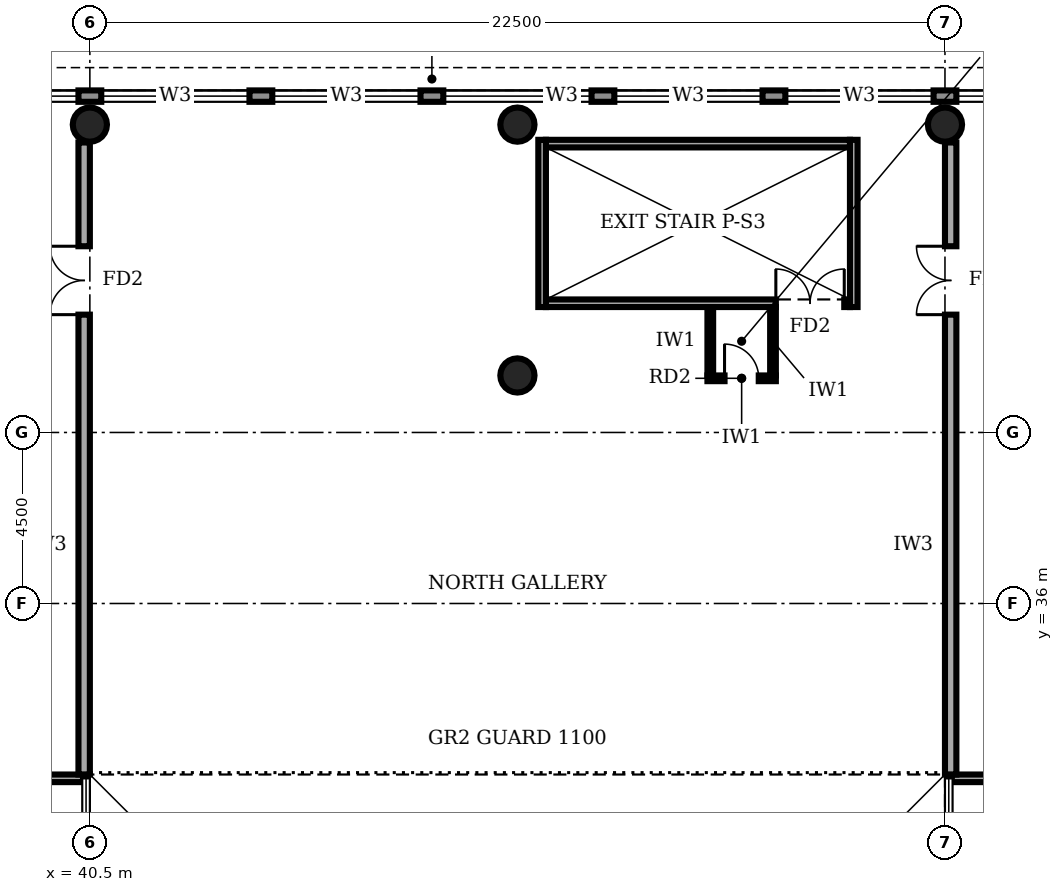
"""IFC4 building model, lengths in metres.
Left out: names, types, materials, properties, quantities, classifications, styles, units other than length and angle.
Written with IfcOpenShell. Run it as: python <this file> out.ifc"""

import sys

from ifc_helpers import new_model, si_unit, direction, frame, frame_2d, origin, origin_2d, place, context, subcontext, project, spatial, rectangle, circle, extrude, element, fill, save


model = new_model("IFC4")
c1 = context("Model", 3, precision=1e-05, world=origin(), true_north=direction((0.0, 1.0)))
c2 = subcontext(c1, "Body", "Model", "MODEL_VIEW")
j1 = project(units=[si_unit("LENGTHUNIT", "METRE"), si_unit("PLANEANGLEUNIT", "RADIAN")], contexts=[c1])
p1 = place(None, origin())
s1 = spatial("IfcSite", under=j1, at=p1, CompositionType="ELEMENT")
p2 = place(p1, origin())
s2 = spatial("IfcBuilding", under=s1, at=p2, CompositionType="ELEMENT")
p3 = place(p2, frame((0.0, 0.0, 16.0)))
s3 = spatial("IfcBuildingStorey", under=s2, at=p3, CompositionType="ELEMENT", Elevation=16.0)
for number, where, z_axis, x_axis in (
    (1, (51.75, 42.0, 0.0), (0.0, 0.0, 1.0), (1.0, 0.0, 0.0)),
    (2, (40.5, 48.6, 0.0), (0.0, 0.0, 1.0), (1.0, 0.0, 0.0)),
    (3, (51.75, 48.6, 0.0), (0.0, 0.0, 1.0), (1.0, 0.0, 0.0)),
    (4, (63.0, 48.6, 0.0), (0.0, 0.0, 1.0), (1.0, 0.0, 0.0)),
):
    element("IfcColumn", number, at=place(p3, frame(where, z_axis=z_axis, x_axis=x_axis)), inside=s3, PredefinedType="COLUMN", context=c2, shape_type="SweptSolid", body=[
        extrude(circle(Radius=0.45, at=origin_2d()), origin(), (0.0, 0.0, 1.0), 5.0),
    ])
p4 = place(p3, frame((98.98, 49.35, 0.0), z_axis=(0.0, 0.0, 1.0), x_axis=(-1.0, 0.0, 0.0)))
e5 = element("IfcWall", 5, at=p4, inside=s3, PredefinedType="STANDARD", context=c2, shape_type="SweptSolid", body=[
    extrude(rectangle(XDim=98.96, YDim=0.3, at=frame_2d((49.48, 0.0))), origin(), (0.0, 0.0, 1.0), 4.7),
])
p5 = place(p4, frame((94.78, 0.0, 0.95)))
e6 = element("IfcOpeningElement", 6, at=p5, cuts=e5, PredefinedType="OPENING", context=c2, shape_type="SweptSolid", body=[
    extrude(rectangle(XDim=3.9, YDim=1.8, at=frame_2d((1.95, 0.9))), frame((0.0, 0.16, 0.0), z_axis=(0.0, -1.0, 0.0), x_axis=(1.0, 0.0, 0.0)), (0.0, 0.0, 1.0), 0.32),
])
p6 = place(p4, frame((90.28, 0.0, 0.95)))
e7 = element("IfcOpeningElement", 7, at=p6, cuts=e5, PredefinedType="OPENING", context=c2, shape_type="SweptSolid", body=[
    extrude(rectangle(XDim=3.9, YDim=1.8, at=frame_2d((1.95, 0.9))), frame((0.0, 0.16, 0.0), z_axis=(0.0, -1.0, 0.0), x_axis=(1.0, 0.0, 0.0)), (0.0, 0.0, 1.0), 0.32),
])
p7 = place(p4, frame((85.78, 0.0, 0.95)))
e8 = element("IfcOpeningElement", 8, at=p7, cuts=e5, PredefinedType="OPENING", context=c2, shape_type="SweptSolid", body=[
    extrude(rectangle(XDim=3.9, YDim=1.8, at=frame_2d((1.95, 0.9))), frame((0.0, 0.16, 0.0), z_axis=(0.0, -1.0, 0.0), x_axis=(1.0, 0.0, 0.0)), (0.0, 0.0, 1.0), 0.32),
])
p8 = place(p4, frame((81.28, 0.0, 0.95)))
e9 = element("IfcOpeningElement", 9, at=p8, cuts=e5, PredefinedType="OPENING", context=c2, shape_type="SweptSolid", body=[
    extrude(rectangle(XDim=3.9, YDim=1.8, at=frame_2d((1.95, 0.9))), frame((0.0, 0.16, 0.0), z_axis=(0.0, -1.0, 0.0), x_axis=(1.0, 0.0, 0.0)), (0.0, 0.0, 1.0), 0.32),
])
p9 = place(p4, frame((76.78, 0.0, 0.95)))
e10 = element("IfcOpeningElement", 10, at=p9, cuts=e5, PredefinedType="OPENING", context=c2, shape_type="SweptSolid", body=[
    extrude(rectangle(XDim=3.9, YDim=1.8, at=frame_2d((1.95, 0.9))), frame((0.0, 0.16, 0.0), z_axis=(0.0, -1.0, 0.0), x_axis=(1.0, 0.0, 0.0)), (0.0, 0.0, 1.0), 0.32),
])
p10 = place(p4, frame((72.28, 0.0, 0.95)))
e11 = element("IfcOpeningElement", 11, at=p10, cuts=e5, PredefinedType="OPENING", context=c2, shape_type="SweptSolid", body=[
    extrude(rectangle(XDim=3.9, YDim=1.8, at=frame_2d((1.95, 0.9))), frame((0.0, 0.16, 0.0), z_axis=(0.0, -1.0, 0.0), x_axis=(1.0, 0.0, 0.0)), (0.0, 0.0, 1.0), 0.32),
])
p11 = place(p4, frame((67.78, 0.0, 0.95)))
e12 = element("IfcOpeningElement", 12, at=p11, cuts=e5, PredefinedType="OPENING", context=c2, shape_type="SweptSolid", body=[
    extrude(rectangle(XDim=3.9, YDim=1.8, at=frame_2d((1.95, 0.9))), frame((0.0, 0.16, 0.0), z_axis=(0.0, -1.0, 0.0), x_axis=(1.0, 0.0, 0.0)), (0.0, 0.0, 1.0), 0.32),
])
p12 = place(p4, frame((63.28, 0.0, 0.95)))
e13 = element("IfcOpeningElement", 13, at=p12, cuts=e5, PredefinedType="OPENING", context=c2, shape_type="SweptSolid", body=[
    extrude(rectangle(XDim=3.9, YDim=1.8, at=frame_2d((1.95, 0.9))), frame((0.0, 0.16, 0.0), z_axis=(0.0, -1.0, 0.0), x_axis=(1.0, 0.0, 0.0)), (0.0, 0.0, 1.0), 0.32),
])
p13 = place(p4, frame((58.78, 0.0, 0.95)))
e14 = element("IfcOpeningElement", 14, at=p13, cuts=e5, PredefinedType="OPENING", context=c2, shape_type="SweptSolid", body=[
    extrude(rectangle(XDim=3.9, YDim=1.8, at=frame_2d((1.95, 0.9))), frame((0.0, 0.16, 0.0), z_axis=(0.0, -1.0, 0.0), x_axis=(1.0, 0.0, 0.0)), (0.0, 0.0, 1.0), 0.32),
])
p14 = place(p4, frame((54.28, 0.0, 0.95)))
e15 = element("IfcOpeningElement", 15, at=p14, cuts=e5, PredefinedType="OPENING", context=c2, shape_type="SweptSolid", body=[
    extrude(rectangle(XDim=3.9, YDim=1.8, at=frame_2d((1.95, 0.9))), frame((0.0, 0.16, 0.0), z_axis=(0.0, -1.0, 0.0), x_axis=(1.0, 0.0, 0.0)), (0.0, 0.0, 1.0), 0.32),
])
p15 = place(p4, frame((49.78, 0.0, 0.95)))
e16 = element("IfcOpeningElement", 16, at=p15, cuts=e5, PredefinedType="OPENING", context=c2, shape_type="SweptSolid", body=[
    extrude(rectangle(XDim=3.9, YDim=1.8, at=frame_2d((1.95, 0.9))), frame((0.0, 0.16, 0.0), z_axis=(0.0, -1.0, 0.0), x_axis=(1.0, 0.0, 0.0)), (0.0, 0.0, 1.0), 0.32),
])
p16 = place(p4, frame((45.28, 0.0, 0.95)))
e17 = element("IfcOpeningElement", 17, at=p16, cuts=e5, PredefinedType="OPENING", context=c2, shape_type="SweptSolid", body=[
    extrude(rectangle(XDim=3.9, YDim=1.8, at=frame_2d((1.95, 0.9))), frame((0.0, 0.16, 0.0), z_axis=(0.0, -1.0, 0.0), x_axis=(1.0, 0.0, 0.0)), (0.0, 0.0, 1.0), 0.32),
])
p17 = place(p4, frame((40.78, 0.0, 0.95)))
e18 = element("IfcOpeningElement", 18, at=p17, cuts=e5, PredefinedType="OPENING", context=c2, shape_type="SweptSolid", body=[
    extrude(rectangle(XDim=3.9, YDim=1.8, at=frame_2d((1.95, 0.9))), frame((0.0, 0.16, 0.0), z_axis=(0.0, -1.0, 0.0), x_axis=(1.0, 0.0, 0.0)), (0.0, 0.0, 1.0), 0.32),
])
p18 = place(p4, frame((36.28, 0.0, 0.95)))
e19 = element("IfcOpeningElement", 19, at=p18, cuts=e5, PredefinedType="OPENING", context=c2, shape_type="SweptSolid", body=[
    extrude(rectangle(XDim=3.9, YDim=1.8, at=frame_2d((1.95, 0.9))), frame((0.0, 0.16, 0.0), z_axis=(0.0, -1.0, 0.0), x_axis=(1.0, 0.0, 0.0)), (0.0, 0.0, 1.0), 0.32),
])
p19 = place(p4, frame((31.78, 0.0, 0.95)))
e20 = element("IfcOpeningElement", 20, at=p19, cuts=e5, PredefinedType="OPENING", context=c2, shape_type="SweptSolid", body=[
    extrude(rectangle(XDim=3.9, YDim=1.8, at=frame_2d((1.95, 0.9))), frame((0.0, 0.16, 0.0), z_axis=(0.0, -1.0, 0.0), x_axis=(1.0, 0.0, 0.0)), (0.0, 0.0, 1.0), 0.32),
])
p20 = place(p4, frame((27.28, 0.0, 0.95)))
e21 = element("IfcOpeningElement", 21, at=p20, cuts=e5, PredefinedType="OPENING", context=c2, shape_type="SweptSolid", body=[
    extrude(rectangle(XDim=3.9, YDim=1.8, at=frame_2d((1.95, 0.9))), frame((0.0, 0.16, 0.0), z_axis=(0.0, -1.0, 0.0), x_axis=(1.0, 0.0, 0.0)), (0.0, 0.0, 1.0), 0.32),
])
p21 = place(p4, frame((22.78, 0.0, 0.95)))
e22 = element("IfcOpeningElement", 22, at=p21, cuts=e5, PredefinedType="OPENING", context=c2, shape_type="SweptSolid", body=[
    extrude(rectangle(XDim=3.9, YDim=1.8, at=frame_2d((1.95, 0.9))), frame((0.0, 0.16, 0.0), z_axis=(0.0, -1.0, 0.0), x_axis=(1.0, 0.0, 0.0)), (0.0, 0.0, 1.0), 0.32),
])
p22 = place(p4, frame((18.28, 0.0, 0.95)))
e23 = element("IfcOpeningElement", 23, at=p22, cuts=e5, PredefinedType="OPENING", context=c2, shape_type="SweptSolid", body=[
    extrude(rectangle(XDim=3.9, YDim=1.8, at=frame_2d((1.95, 0.9))), frame((0.0, 0.16, 0.0), z_axis=(0.0, -1.0, 0.0), x_axis=(1.0, 0.0, 0.0)), (0.0, 0.0, 1.0), 0.32),
])
p23 = place(p4, frame((13.78, 0.0, 0.95)))
e24 = element("IfcOpeningElement", 24, at=p23, cuts=e5, PredefinedType="OPENING", context=c2, shape_type="SweptSolid", body=[
    extrude(rectangle(XDim=3.9, YDim=1.8, at=frame_2d((1.95, 0.9))), frame((0.0, 0.16, 0.0), z_axis=(0.0, -1.0, 0.0), x_axis=(1.0, 0.0, 0.0)), (0.0, 0.0, 1.0), 0.32),
])
p24 = place(p4, frame((9.28, 0.0, 0.95)))
e25 = element("IfcOpeningElement", 25, at=p24, cuts=e5, PredefinedType="OPENING", context=c2, shape_type="SweptSolid", body=[
    extrude(rectangle(XDim=3.9, YDim=1.8, at=frame_2d((1.95, 0.9))), frame((0.0, 0.16, 0.0), z_axis=(0.0, -1.0, 0.0), x_axis=(1.0, 0.0, 0.0)), (0.0, 0.0, 1.0), 0.32),
])
p25 = place(p4, frame((4.78, 0.0, 0.95)))
e26 = element("IfcOpeningElement", 26, at=p25, cuts=e5, PredefinedType="OPENING", context=c2, shape_type="SweptSolid", body=[
    extrude(rectangle(XDim=3.9, YDim=1.8, at=frame_2d((1.95, 0.9))), frame((0.0, 0.16, 0.0), z_axis=(0.0, -1.0, 0.0), x_axis=(1.0, 0.0, 0.0)), (0.0, 0.0, 1.0), 0.32),
])
p26 = place(p3, frame((28.8, 31.4, 0.0), z_axis=(0.0, 0.0, 1.0), x_axis=(1.0, 0.0, 0.0)))
e27 = element("IfcWall", 27, at=p26, inside=s3, PredefinedType="SOLIDWALL", context=c2, shape_type="SweptSolid", body=[
    extrude(rectangle(XDim=11.52, YDim=0.2, at=frame_2d((5.76, 0.0))), origin(), (0.0, 0.0, 1.0), 4.7),
])
p27 = place(p3, frame((63.18, 31.4, 0.0), z_axis=(0.0, 0.0, 1.0), x_axis=(1.0, 0.0, 0.0)))
e28 = element("IfcWall", 28, at=p27, inside=s3, PredefinedType="SOLIDWALL", context=c2, shape_type="SweptSolid", body=[
    extrude(rectangle(XDim=9.27, YDim=0.2, at=frame_2d((4.635, 0.0))), origin(), (0.0, 0.0, 1.0), 4.7),
])
p28 = place(p3, frame((52.5, 43.9, 0.0), z_axis=(0.0, 0.0, 1.0), x_axis=(1.0, 0.0, 0.0)))
e29 = element("IfcWall", 29, at=p28, inside=s3, PredefinedType="SOLIDWALL", context=c2, shape_type="SweptSolid", body=[
    extrude(rectangle(XDim=8.0, YDim=0.2, at=frame_2d((4.0, 0.0))), origin(), (0.0, 0.0, 1.0), 4.7),
])
p29 = place(p28, frame((6.05, 0.0, 0.0)))
e30 = element("IfcOpeningElement", 30, at=p29, cuts=e29, PredefinedType="OPENING", context=c2, shape_type="SweptSolid", body=[
    extrude(rectangle(XDim=1.8, YDim=2.1, at=frame_2d((0.9, 1.05))), frame((0.0, 0.11, 0.0), z_axis=(0.0, -1.0, 0.0), x_axis=(1.0, 0.0, 0.0)), (0.0, 0.0, 1.0), 0.22),
])
p30 = place(p3, frame((52.5, 48.1, 0.0), z_axis=(0.0, 0.0, 1.0), x_axis=(1.0, 0.0, 0.0)))
e31 = element("IfcWall", 31, at=p30, inside=s3, PredefinedType="SOLIDWALL", context=c2, shape_type="SweptSolid", body=[
    extrude(rectangle(XDim=8.0, YDim=0.2, at=frame_2d((4.0, 0.0))), origin(), (0.0, 0.0, 1.0), 4.7),
])
for number, where, z_axis, x_axis in (
    (32, (52.4, 43.8, 0.0), (0.0, 0.0, 1.0), (0.0, 1.0, 0.0)),
    (33, (60.6, 43.8, 0.0), (0.0, 0.0, 1.0), (0.0, 1.0, 0.0)),
):
    element("IfcWall", number, at=place(p3, frame(where, z_axis=z_axis, x_axis=x_axis)), inside=s3, PredefinedType="SOLIDWALL", context=c2, shape_type="SweptSolid", body=[
        extrude(rectangle(XDim=4.4, YDim=0.2, at=frame_2d((2.2, 0.0))), origin(), (0.0, 0.0, 1.0), 4.7),
    ])
p31 = place(p3, frame((40.35, 31.5, 0.0), z_axis=(0.0, 0.0, 1.0), x_axis=(0.0, 1.0, 0.0)))
e34 = element("IfcWall", 34, at=p31, inside=s3, PredefinedType="SOLIDWALL", context=c2, shape_type="SweptSolid", body=[
    extrude(rectangle(XDim=16.63, YDim=0.3, at=frame_2d((8.315, 0.0))), origin(), (0.0, 0.0, 1.0), 4.7),
])
p32 = place(p31, frame((12.1, 0.0, 0.0)))
e35 = element("IfcOpeningElement", 35, at=p32, cuts=e34, PredefinedType="OPENING", context=c2, shape_type="SweptSolid", body=[
    extrude(rectangle(XDim=1.8, YDim=2.1, at=frame_2d((0.9, 1.05))), frame((0.0, 0.16, 0.0), z_axis=(0.0, -1.0, 0.0), x_axis=(1.0, 0.0, 0.0)), (0.0, 0.0, 1.0), 0.32),
])
p33 = place(p3, frame((63.15, 31.5, 0.0), z_axis=(0.0, 0.0, 1.0), x_axis=(0.0, 1.0, 0.0)))
e36 = element("IfcWall", 36, at=p33, inside=s3, PredefinedType="SOLIDWALL", context=c2, shape_type="SweptSolid", body=[
    extrude(rectangle(XDim=16.63, YDim=0.3, at=frame_2d((8.315, 0.0))), origin(), (0.0, 0.0, 1.0), 4.7),
])
p34 = place(p33, frame((12.1, 0.0, 0.0)))
e37 = element("IfcOpeningElement", 37, at=p34, cuts=e36, PredefinedType="OPENING", context=c2, shape_type="SweptSolid", body=[
    extrude(rectangle(XDim=1.8, YDim=2.1, at=frame_2d((0.9, 1.05))), frame((0.0, 0.16, 0.0), z_axis=(0.0, -1.0, 0.0), x_axis=(1.0, 0.0, 0.0)), (0.0, 0.0, 1.0), 0.32),
])
p35 = place(p3, frame((58.475, 42.0, 0.0), z_axis=(0.0, 0.0, 1.0), x_axis=(0.0, 1.0, 0.0)))
e38 = element("IfcWall", 38, at=p35, inside=s3, PredefinedType="PARTITIONING", context=c2, shape_type="SweptSolid", body=[
    extrude(rectangle(XDim=1.8, YDim=0.15, at=frame_2d((0.9, 0.0))), origin(), (0.0, 0.0, 1.0), 4.7),
])
p36 = place(p3, frame((56.75, 41.925, 0.0), z_axis=(0.0, 0.0, 1.0), x_axis=(1.0, 0.0, 0.0)))
e39 = element("IfcWall", 39, at=p36, inside=s3, PredefinedType="PARTITIONING", context=c2, shape_type="SweptSolid", body=[
    extrude(rectangle(XDim=1.8, YDim=0.15, at=frame_2d((0.9, 0.0))), origin(), (0.0, 0.0, 1.0), 4.7),
])
p37 = place(p36, frame((0.45, 0.0, 0.0)))
e40 = element("IfcOpeningElement", 40, at=p37, cuts=e39, PredefinedType="OPENING", context=c2, shape_type="SweptSolid", body=[
    extrude(rectangle(XDim=0.9, YDim=2.1, at=frame_2d((0.45, 1.05))), frame((0.0, 0.085, 0.0), z_axis=(0.0, -1.0, 0.0), x_axis=(1.0, 0.0, 0.0)), (0.0, 0.0, 1.0), 0.17),
])
p38 = place(p3, frame((56.825, 42.0, 0.0), z_axis=(0.0, 0.0, 1.0), x_axis=(0.0, 1.0, 0.0)))
e41 = element("IfcWall", 41, at=p38, inside=s3, PredefinedType="PARTITIONING", context=c2, shape_type="SweptSolid", body=[
    extrude(rectangle(XDim=1.8, YDim=0.15, at=frame_2d((0.9, 0.0))), origin(), (0.0, 0.0, 1.0), 4.7),
])
p39 = place(p13, origin())
e42 = element("IfcWindow", 42, at=p39, inside=s3, PartitioningType="SINGLE_PANEL", PredefinedType="WINDOW", context=c2, shape_type="SweptSolid", body=[
    extrude(rectangle(XDim=3.9, YDim=1.8, at=frame_2d((1.95, 0.9))), frame((0.0, 0.03, 0.0), z_axis=(0.0, -1.0, 0.0), x_axis=(1.0, 0.0, 0.0)), (0.0, 0.0, 1.0), 0.06),
])
fill(e14, e42)
p40 = place(p14, origin())
e43 = element("IfcWindow", 43, at=p40, inside=s3, PartitioningType="SINGLE_PANEL", PredefinedType="WINDOW", context=c2, shape_type="SweptSolid", body=[
    extrude(rectangle(XDim=3.9, YDim=1.8, at=frame_2d((1.95, 0.9))), frame((0.0, 0.03, 0.0), z_axis=(0.0, -1.0, 0.0), x_axis=(1.0, 0.0, 0.0)), (0.0, 0.0, 1.0), 0.06),
])
fill(e15, e43)
p41 = place(p15, origin())
e44 = element("IfcWindow", 44, at=p41, inside=s3, PartitioningType="SINGLE_PANEL", PredefinedType="WINDOW", context=c2, shape_type="SweptSolid", body=[
    extrude(rectangle(XDim=3.9, YDim=1.8, at=frame_2d((1.95, 0.9))), frame((0.0, 0.03, 0.0), z_axis=(0.0, -1.0, 0.0), x_axis=(1.0, 0.0, 0.0)), (0.0, 0.0, 1.0), 0.06),
])
fill(e16, e44)
p42 = place(p16, origin())
e45 = element("IfcWindow", 45, at=p42, inside=s3, PartitioningType="SINGLE_PANEL", PredefinedType="WINDOW", context=c2, shape_type="SweptSolid", body=[
    extrude(rectangle(XDim=3.9, YDim=1.8, at=frame_2d((1.95, 0.9))), frame((0.0, 0.03, 0.0), z_axis=(0.0, -1.0, 0.0), x_axis=(1.0, 0.0, 0.0)), (0.0, 0.0, 1.0), 0.06),
])
fill(e17, e45)
p43 = place(p17, origin())
e46 = element("IfcWindow", 46, at=p43, inside=s3, PartitioningType="SINGLE_PANEL", PredefinedType="WINDOW", context=c2, shape_type="SweptSolid", body=[
    extrude(rectangle(XDim=3.9, YDim=1.8, at=frame_2d((1.95, 0.9))), frame((0.0, 0.03, 0.0), z_axis=(0.0, -1.0, 0.0), x_axis=(1.0, 0.0, 0.0)), (0.0, 0.0, 1.0), 0.06),
])
fill(e18, e46)
p44 = place(p18, origin())
e47 = element("IfcWindow", 47, at=p44, inside=s3, PartitioningType="SINGLE_PANEL", PredefinedType="WINDOW", context=c2, shape_type="SweptSolid", body=[
    extrude(rectangle(XDim=3.9, YDim=1.8, at=frame_2d((1.95, 0.9))), frame((0.0, 0.03, 0.0), z_axis=(0.0, -1.0, 0.0), x_axis=(1.0, 0.0, 0.0)), (0.0, 0.0, 1.0), 0.06),
])
fill(e19, e47)
p45 = place(p19, origin())
e48 = element("IfcWindow", 48, at=p45, inside=s3, PartitioningType="SINGLE_PANEL", PredefinedType="WINDOW", context=c2, shape_type="SweptSolid", body=[
    extrude(rectangle(XDim=3.9, YDim=1.8, at=frame_2d((1.95, 0.9))), frame((0.0, 0.03, 0.0), z_axis=(0.0, -1.0, 0.0), x_axis=(1.0, 0.0, 0.0)), (0.0, 0.0, 1.0), 0.06),
])
fill(e20, e48)
p46 = place(p29, origin())
e49 = element("IfcDoor", 49, at=p46, inside=s3, OperationType="DOUBLE_DOOR_SINGLE_SWING", PredefinedType="DOOR", context=c2, shape_type="SweptSolid", body=[
    extrude(rectangle(XDim=1.8, YDim=2.1, at=frame_2d((0.9, 1.05))), frame((0.0, 0.025, 0.0), z_axis=(0.0, -1.0, 0.0), x_axis=(1.0, 0.0, 0.0)), (0.0, 0.0, 1.0), 0.05),
])
fill(e30, e49)
p47 = place(p32, origin())
e50 = element("IfcDoor", 50, at=p47, inside=s3, OperationType="DOUBLE_DOOR_SINGLE_SWING", PredefinedType="DOOR", context=c2, shape_type="SweptSolid", body=[
    extrude(rectangle(XDim=1.8, YDim=2.1, at=frame_2d((0.9, 1.05))), frame((0.0, 0.025, 0.0), z_axis=(0.0, -1.0, 0.0), x_axis=(1.0, 0.0, 0.0)), (0.0, 0.0, 1.0), 0.05),
])
fill(e35, e50)
p48 = place(p34, origin())
e51 = element("IfcDoor", 51, at=p48, inside=s3, OperationType="DOUBLE_DOOR_SINGLE_SWING", PredefinedType="DOOR", context=c2, shape_type="SweptSolid", body=[
    extrude(rectangle(XDim=1.8, YDim=2.1, at=frame_2d((0.9, 1.05))), frame((0.0, 0.025, 0.0), z_axis=(0.0, -1.0, 0.0), x_axis=(1.0, 0.0, 0.0)), (0.0, 0.0, 1.0), 0.05),
])
fill(e37, e51)
p49 = place(p37, origin())
e52 = element("IfcDoor", 52, at=p49, inside=s3, OperationType="SINGLE_SWING_LEFT", PredefinedType="DOOR", context=c2, shape_type="SweptSolid", body=[
    extrude(rectangle(XDim=0.9, YDim=2.1, at=frame_2d((0.45, 1.05))), frame((0.0, 0.025, 0.0), z_axis=(0.0, -1.0, 0.0), x_axis=(1.0, 0.0, 0.0)), (0.0, 0.0, 1.0), 0.05),
])
fill(e40, e52)
save(model, sys.argv[1])
